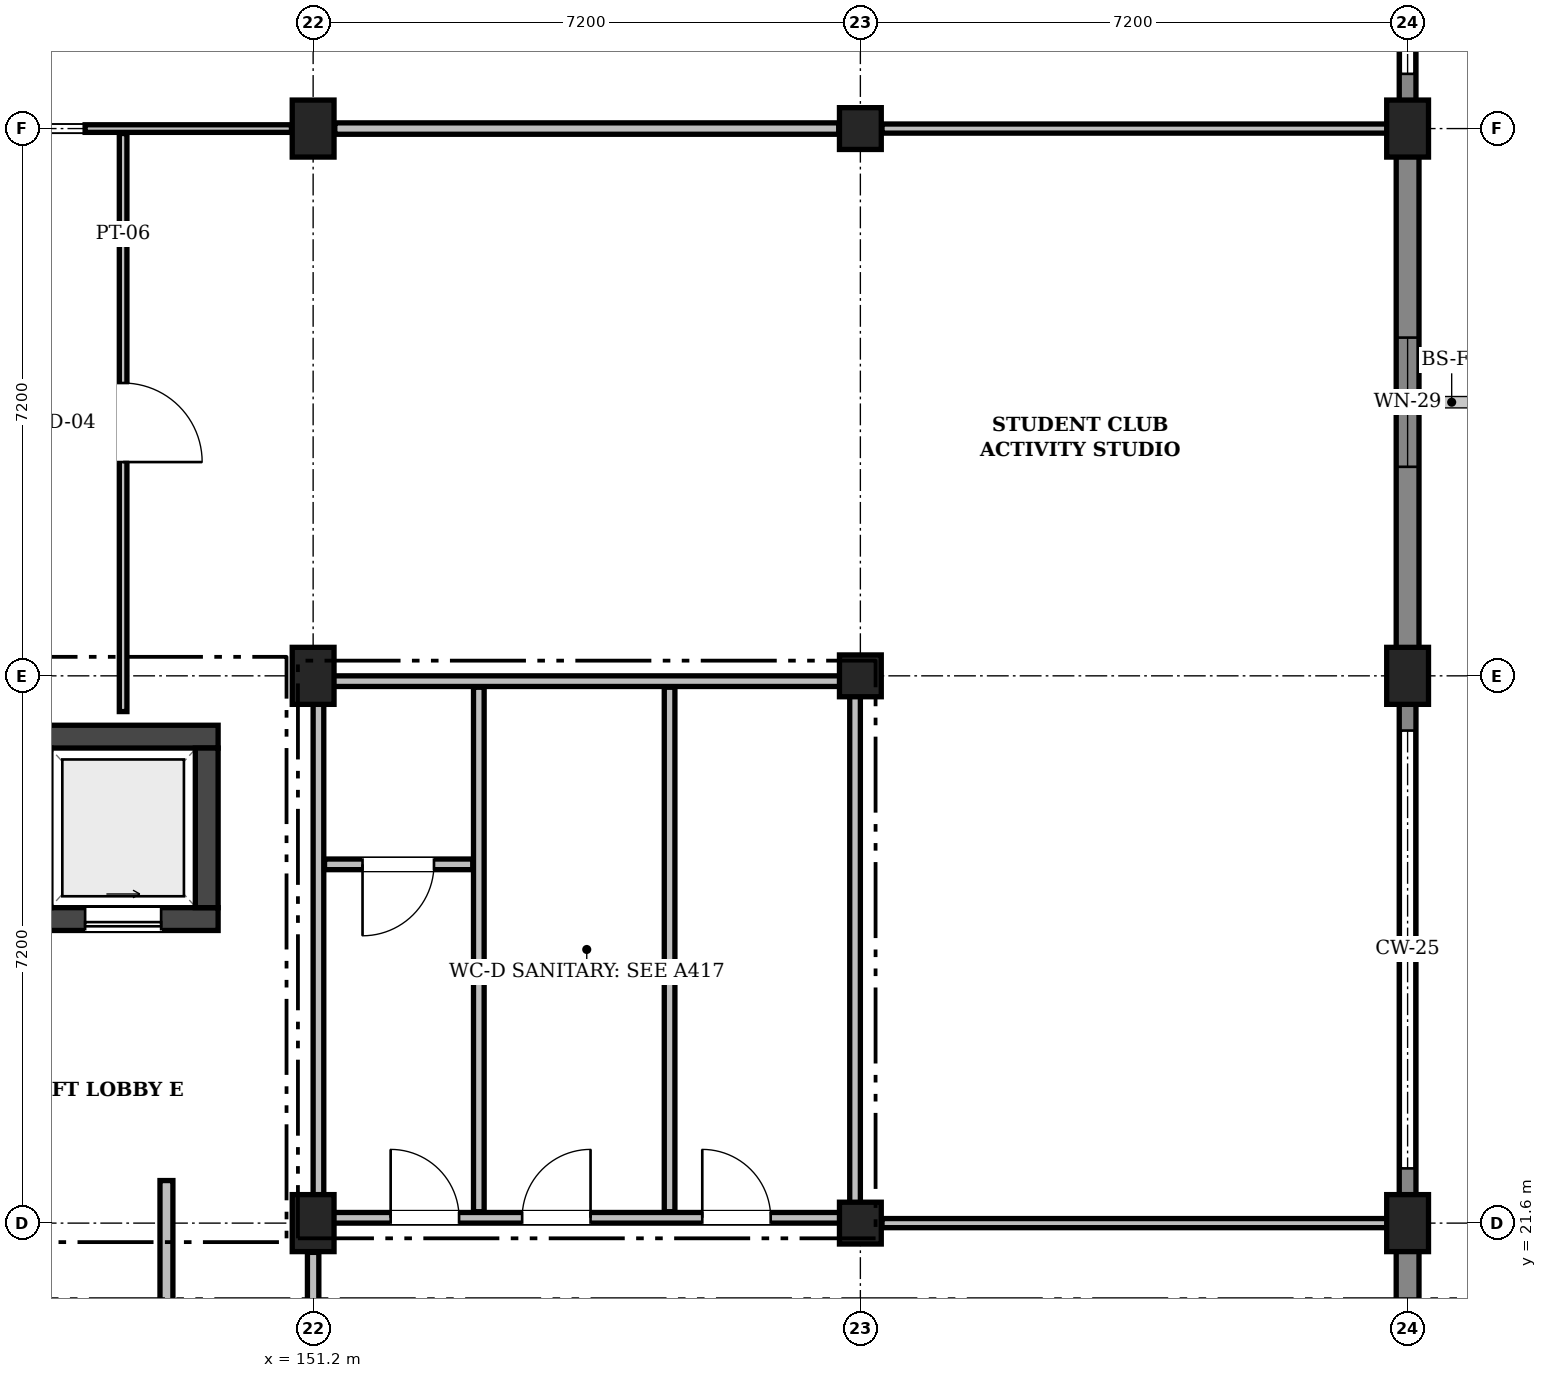
"""IFC4 building model, lengths in metres.
Left out: names, types, materials, properties, quantities, classifications, styles, units other than length and angle.
Written with IfcOpenShell. Run it as: python <this file> out.ifc"""

import sys

from ifc_helpers import new_model, si_unit, direction, frame, frame_2d, origin, origin_2d, place, context, subcontext, project, spatial, rectangle, extrude, element, fill, save


model = new_model("IFC4")
c1 = context("Model", 3, precision=1e-05, world=origin(), true_north=direction((0.0, 1.0)))
c2 = subcontext(c1, "Body", "Model", "MODEL_VIEW")
j1 = project(units=[si_unit("LENGTHUNIT", "METRE"), si_unit("PLANEANGLEUNIT", "RADIAN")], contexts=[c1])
p1 = place(None, origin())
s1 = spatial("IfcSite", under=j1, at=p1, CompositionType="ELEMENT")
p2 = place(p1, origin())
s2 = spatial("IfcBuilding", under=s1, at=p2, CompositionType="ELEMENT")
p3 = place(p2, frame((0.0, 0.0, 4.8)))
s3 = spatial("IfcBuildingStorey", under=s2, at=p3, CompositionType="ELEMENT", Elevation=4.8)
for number, where, z_axis, x_axis in (
    (1, (151.2, 21.6, 0.0), (0.0, 0.0, 1.0), (1.0, 0.0, 0.0)),
    (2, (151.2, 28.8, 0.0), (0.0, 0.0, 1.0), (1.0, 0.0, 0.0)),
    (3, (151.2, 36.0, 0.0), (0.0, 0.0, 1.0), (1.0, 0.0, 0.0)),
):
    element("IfcColumn", number, at=place(p3, frame(where, z_axis=z_axis, x_axis=x_axis)), inside=s3, PredefinedType="COLUMN", context=c2, shape_type="SweptSolid", body=[
        extrude(rectangle(XDim=0.55, YDim=0.75, at=origin_2d()), origin(), (0.0, 0.0, 1.0), 4.8),
    ])
for number, where, z_axis, x_axis in (
    (4, (158.4, 21.6, 0.0), (0.0, 0.0, 1.0), (1.0, 0.0, 0.0)),
    (5, (158.4, 28.8, 0.0), (0.0, 0.0, 1.0), (1.0, 0.0, 0.0)),
    (6, (158.4, 36.0, 0.0), (0.0, 0.0, 1.0), (1.0, 0.0, 0.0)),
):
    element("IfcColumn", number, at=place(p3, frame(where, z_axis=z_axis, x_axis=x_axis)), inside=s3, PredefinedType="COLUMN", context=c2, shape_type="SweptSolid", body=[
        extrude(rectangle(XDim=0.55, YDim=0.55, at=origin_2d()), origin(), (0.0, 0.0, 1.0), 4.8),
    ])
for number, where, z_axis, x_axis in (
    (7, (165.6, 21.6, 0.0), (0.0, 0.0, 1.0), (1.0, 0.0, 0.0)),
    (8, (165.6, 28.8, 0.0), (0.0, 0.0, 1.0), (1.0, 0.0, 0.0)),
    (9, (165.6, 36.0, 0.0), (0.0, 0.0, 1.0), (1.0, 0.0, 0.0)),
):
    element("IfcColumn", number, at=place(p3, frame(where, z_axis=z_axis, x_axis=x_axis)), inside=s3, PredefinedType="COLUMN", context=c2, shape_type="SweptSolid", body=[
        extrude(rectangle(XDim=0.55, YDim=0.75, at=origin_2d()), origin(), (0.0, 0.0, 1.0), 4.8),
    ])
p4 = place(p3, frame((165.6, 43.2, 0.0), z_axis=(0.0, 0.0, 1.0), x_axis=(0.0, -1.0, 0.0)))
e10 = element("IfcWall", 10, at=p4, inside=s3, PredefinedType="SOLIDWALL", context=c2, shape_type="SweptSolid", body=[
    extrude(rectangle(XDim=7.2, YDim=0.22, at=frame_2d((3.6, 0.0))), origin(), (0.0, 0.0, 1.0), 1.24),
])
p5 = place(p3, frame((165.6, 36.0, 0.0), z_axis=(0.0, 0.0, 1.0), x_axis=(0.0, -1.0, 0.0)))
e11 = element("IfcWall", 11, at=p5, inside=s3, PredefinedType="SOLIDWALL", context=c2, shape_type="SweptSolid", body=[
    extrude(rectangle(XDim=7.2, YDim=0.3, at=frame_2d((3.6, 0.0))), origin(), (0.0, 0.0, 1.0), 4.52),
])
p6 = place(p5, frame((2.75, 0.0, 0.95)))
e12 = element("IfcOpeningElement", 12, at=p6, cuts=e11, PredefinedType="OPENING", context=c2, shape_type="SweptSolid", body=[
    extrude(rectangle(XDim=1.7, YDim=1.8, at=frame_2d((0.85, 0.9))), frame((0.0, 0.162, 0.0), z_axis=(0.0, -1.0, 0.0), x_axis=(1.0, 0.0, 0.0)), (0.0, 0.0, 1.0), 0.324),
])
p7 = place(p3, frame((165.6, 28.8, 0.0), z_axis=(0.0, 0.0, 1.0), x_axis=(0.0, -1.0, 0.0)))
e13 = element("IfcWall", 13, at=p7, inside=s3, PredefinedType="SOLIDWALL", context=c2, shape_type="SweptSolid", body=[
    extrude(rectangle(XDim=7.2, YDim=0.22, at=frame_2d((3.6, 0.0))), origin(), (0.0, 0.0, 1.0), 1.24),
])
p8 = place(p3, frame((165.6, 21.6, 0.0), z_axis=(0.0, 0.0, 1.0), x_axis=(0.0, -1.0, 0.0)))
e14 = element("IfcWall", 14, at=p8, inside=s3, PredefinedType="SOLIDWALL", context=c2, shape_type="SweptSolid", body=[
    extrude(rectangle(XDim=7.2, YDim=0.3, at=frame_2d((3.6, 0.0))), origin(), (0.0, 0.0, 1.0), 4.52),
])
p9 = place(p8, frame((2.625, 0.0, 0.95)))
e15 = element("IfcOpeningElement", 15, at=p9, cuts=e14, PredefinedType="OPENING", context=c2, shape_type="SweptSolid", body=[
    extrude(rectangle(XDim=1.95, YDim=1.8, at=frame_2d((0.975, 0.9))), frame((0.0, 0.162, 0.0), z_axis=(0.0, -1.0, 0.0), x_axis=(1.0, 0.0, 0.0)), (0.0, 0.0, 1.0), 0.324),
])
p10 = place(p3, frame((147.45, 25.6, 0.0), z_axis=(0.0, 0.0, 1.0), x_axis=(1.0, 0.0, 0.0)))
e16 = element("IfcWall", 16, at=p10, inside=s3, PredefinedType="SHEAR", context=c2, shape_type="SweptSolid", body=[
    extrude(rectangle(XDim=2.5, YDim=0.3, at=frame_2d((1.25, 0.0))), origin(), (0.0, 0.0, 1.0), 4.55),
])
p11 = place(p10, frame((0.75, 0.0, 0.0)))
e17 = element("IfcOpeningElement", 17, at=p11, cuts=e16, PredefinedType="OPENING", context=c2, shape_type="SweptSolid", body=[
    extrude(rectangle(XDim=1.0, YDim=2.1, at=frame_2d((0.5, 1.05))), frame((0.0, 0.162, 0.0), z_axis=(0.0, -1.0, 0.0), x_axis=(1.0, 0.0, 0.0)), (0.0, 0.0, 1.0), 0.324),
])
p12 = place(p3, frame((147.45, 28.0, 0.0), z_axis=(0.0, 0.0, 1.0), x_axis=(1.0, 0.0, 0.0)))
e18 = element("IfcWall", 18, at=p12, inside=s3, PredefinedType="SHEAR", context=c2, shape_type="SweptSolid", body=[
    extrude(rectangle(XDim=2.5, YDim=0.3, at=frame_2d((1.25, 0.0))), origin(), (0.0, 0.0, 1.0), 4.55),
])
p13 = place(p3, frame((149.8, 25.75, 0.0), z_axis=(0.0, 0.0, 1.0), x_axis=(0.0, 1.0, 0.0)))
e19 = element("IfcWall", 19, at=p13, inside=s3, PredefinedType="SHEAR", context=c2, shape_type="SweptSolid", body=[
    extrude(rectangle(XDim=2.1, YDim=0.3, at=frame_2d((1.05, 0.0))), origin(), (0.0, 0.0, 1.0), 4.55),
])
p14 = place(p3, frame((151.27, 21.67, 0.0), z_axis=(0.0, 0.0, 1.0), x_axis=(1.0, 0.0, 0.0)))
e20 = element("IfcWall", 20, at=p14, inside=s3, PredefinedType="PARTITIONING", context=c2, shape_type="SweptSolid", body=[
    extrude(rectangle(XDim=7.06, YDim=0.14, at=frame_2d((3.53, 0.0))), origin(), (0.0, 0.0, 1.0), 3.9),
])
p15 = place(p14, frame((0.95, 0.0, 0.0)))
e21 = element("IfcOpeningElement", 21, at=p15, cuts=e20, PredefinedType="OPENING", context=c2, shape_type="SweptSolid", body=[
    extrude(rectangle(XDim=0.9, YDim=2.08, at=frame_2d((0.45, 1.04))), frame((0.0, 0.082, 0.0), z_axis=(0.0, -1.0, 0.0), x_axis=(1.0, 0.0, 0.0)), (0.0, 0.0, 1.0), 0.164),
])
p16 = place(p14, frame((2.68, 0.0, 0.0)))
e22 = element("IfcOpeningElement", 22, at=p16, cuts=e20, PredefinedType="OPENING", context=c2, shape_type="SweptSolid", body=[
    extrude(rectangle(XDim=0.9, YDim=2.08, at=frame_2d((0.45, 1.04))), frame((0.0, 0.082, 0.0), z_axis=(0.0, -1.0, 0.0), x_axis=(1.0, 0.0, 0.0)), (0.0, 0.0, 1.0), 0.164),
])
p17 = place(p14, frame((5.05, 0.0, 0.0)))
e23 = element("IfcOpeningElement", 23, at=p17, cuts=e20, PredefinedType="OPENING", context=c2, shape_type="SweptSolid", body=[
    extrude(rectangle(XDim=0.9, YDim=2.08, at=frame_2d((0.45, 1.04))), frame((0.0, 0.082, 0.0), z_axis=(0.0, -1.0, 0.0), x_axis=(1.0, 0.0, 0.0)), (0.0, 0.0, 1.0), 0.164),
])
p18 = place(p3, frame((151.27, 28.73, 0.0), z_axis=(0.0, 0.0, 1.0), x_axis=(1.0, 0.0, 0.0)))
e24 = element("IfcWall", 24, at=p18, inside=s3, PredefinedType="PARTITIONING", context=c2, shape_type="SweptSolid", body=[
    extrude(rectangle(XDim=7.06, YDim=0.14, at=frame_2d((3.53, 0.0))), origin(), (0.0, 0.0, 1.0), 3.9),
])
for number, where, z_axis, x_axis in (
    (25, (151.27, 21.75, 0.0), (0.0, 0.0, 1.0), (0.0, 1.0, 0.0)),
    (26, (158.33, 21.75, 0.0), (0.0, 0.0, 1.0), (0.0, 1.0, 0.0)),
):
    element("IfcWall", number, at=place(p3, frame(where, z_axis=z_axis, x_axis=x_axis)), inside=s3, PredefinedType="PARTITIONING", context=c2, shape_type="SweptSolid", body=[
        extrude(rectangle(XDim=6.9, YDim=0.14, at=frame_2d((3.45, 0.0))), origin(), (0.0, 0.0, 1.0), 4.08),
    ])
for number, where, z_axis, x_axis in (
    (27, (153.38, 21.75, 0.0), (0.0, 0.0, 1.0), (0.0, 1.0, 0.0)),
    (28, (155.89, 21.75, 0.0), (0.0, 0.0, 1.0), (0.0, 1.0, 0.0)),
):
    element("IfcWall", number, at=place(p3, frame(where, z_axis=z_axis, x_axis=x_axis)), inside=s3, PredefinedType="PARTITIONING", context=c2, shape_type="SweptSolid", body=[
        extrude(rectangle(XDim=6.9, YDim=0.14, at=frame_2d((3.45, 0.0))), origin(), (0.0, 0.0, 1.0), 4.46),
    ])
p19 = place(p3, frame((151.35, 26.32, 0.0), z_axis=(0.0, 0.0, 1.0), x_axis=(1.0, 0.0, 0.0)))
e29 = element("IfcWall", 29, at=p19, inside=s3, PredefinedType="PARTITIONING", context=c2, shape_type="SweptSolid", body=[
    extrude(rectangle(XDim=1.95, YDim=0.14, at=frame_2d((0.975, 0.0))), origin(), (0.0, 0.0, 1.0), 4.46),
])
p20 = place(p19, frame((0.5, 0.0, 0.0)))
e30 = element("IfcOpeningElement", 30, at=p20, cuts=e29, PredefinedType="OPENING", context=c2, shape_type="SweptSolid", body=[
    extrude(rectangle(XDim=0.94, YDim=2.1, at=frame_2d((0.47, 1.05))), frame((0.0, 0.082, 0.0), z_axis=(0.0, -1.0, 0.0), x_axis=(1.0, 0.0, 0.0)), (0.0, 0.0, 1.0), 0.164),
])
p21 = place(p3, frame((149.27, 19.698, 0.0), z_axis=(0.0, 0.0, 1.0), x_axis=(0.0, 1.0, 0.0)))
e31 = element("IfcWall", 31, at=p21, inside=s3, PredefinedType="PARTITIONING", context=c2, shape_type="SweptSolid", body=[
    extrude(rectangle(XDim=2.462, YDim=0.17, at=frame_2d((1.231, 0.0))), origin(), (0.0, 0.0, 1.0), 4.46),
])
p22 = place(p3, frame((151.485, 36.0, 0.0), z_axis=(0.0, 0.0, 1.0), x_axis=(1.0, 0.0, 0.0)))
e32 = element("IfcWall", 32, at=p22, inside=s3, PredefinedType="PARTITIONING", context=c2, shape_type="SweptSolid", body=[
    extrude(rectangle(XDim=6.63, YDim=0.15, at=frame_2d((3.315, 0.0))), origin(), (0.0, 0.0, 1.0), 3.9),
])
p23 = place(p3, frame((158.685, 36.0, 0.0), z_axis=(0.0, 0.0, 1.0), x_axis=(1.0, 0.0, 0.0)))
e33 = element("IfcWall", 33, at=p23, inside=s3, PredefinedType="PARTITIONING", context=c2, shape_type="SweptSolid", body=[
    extrude(rectangle(XDim=6.753, YDim=0.12, at=frame_2d((3.376, 0.0))), origin(), (0.0, 0.0, 1.0), 3.9),
])
p24 = place(p3, frame((148.2, 36.0, 0.0), z_axis=(0.0, 0.0, 1.0), x_axis=(1.0, 0.0, 0.0)))
e34 = element("IfcWall", 34, at=p24, inside=s3, PredefinedType="PARTITIONING", context=c2, shape_type="SweptSolid", body=[
    extrude(rectangle(XDim=2.715, YDim=0.1, at=frame_2d((1.357, 0.0))), origin(), (0.0, 0.0, 1.0), 3.9),
])
p25 = place(p3, frame((151.2, 14.785, 0.0), z_axis=(0.0, 0.0, 1.0), x_axis=(0.0, 1.0, 0.0)))
e35 = element("IfcWall", 35, at=p25, inside=s3, PredefinedType="PARTITIONING", context=c2, shape_type="SweptSolid", body=[
    extrude(rectangle(XDim=6.43, YDim=0.15, at=frame_2d((3.215, 0.0))), origin(), (0.0, 0.0, 1.0), 4.08),
])
p26 = place(p3, frame((158.685, 21.6, 0.0), z_axis=(0.0, 0.0, 1.0), x_axis=(1.0, 0.0, 0.0)))
e36 = element("IfcWall", 36, at=p26, inside=s3, PredefinedType="PARTITIONING", context=c2, shape_type="SweptSolid", body=[
    extrude(rectangle(XDim=6.753, YDim=0.12, at=frame_2d((3.376, 0.0))), origin(), (0.0, 0.0, 1.0), 3.9),
])
p27 = place(p3, frame((148.7, 28.33, 0.0), z_axis=(0.0, 0.0, 1.0), x_axis=(0.0, 1.0, 0.0)))
e37 = element("IfcWall", 37, at=p27, inside=s3, PredefinedType="PARTITIONING", context=c2, shape_type="SweptSolid", body=[
    extrude(rectangle(XDim=7.605, YDim=0.1, at=frame_2d((3.802, 0.0))), origin(), (0.0, 0.0, 1.0), 4.46),
])
p28 = place(p27, frame((3.282, 0.0, 0.0)))
e38 = element("IfcOpeningElement", 38, at=p28, cuts=e37, PredefinedType="OPENING", context=c2, shape_type="SweptSolid", body=[
    extrude(rectangle(XDim=1.04, YDim=2.18, at=frame_2d((0.52, 1.09))), frame((0.0, 0.062, 0.0), z_axis=(0.0, -1.0, 0.0), x_axis=(1.0, 0.0, 0.0)), (0.0, 0.0, 1.0), 0.124),
])
p29 = place(p6, origin())
e39 = element("IfcWindow", 39, at=p29, inside=s3, PartitioningType="SINGLE_PANEL", PredefinedType="WINDOW", context=c2, shape_type="SweptSolid", body=[
    extrude(rectangle(XDim=1.7, YDim=1.8, at=frame_2d((0.85, 0.9))), frame((0.0, 0.03, 0.0), z_axis=(0.0, -1.0, 0.0), x_axis=(1.0, 0.0, 0.0)), (0.0, 0.0, 1.0), 0.06),
])
fill(e12, e39)
p30 = place(p11, frame((1.0, 0.0, 0.0), z_axis=(0.0, 0.0, 1.0), x_axis=(-1.0, 0.0, 0.0)))
e40 = element("IfcDoor", 40, at=p30, inside=s3, OperationType="SLIDING_TO_RIGHT", PredefinedType="DOOR", context=c2, shape_type="SweptSolid", body=[
    extrude(rectangle(XDim=1.0, YDim=2.1, at=frame_2d((0.5, 1.05))), frame((0.0, 0.025, 0.0), z_axis=(0.0, -1.0, 0.0), x_axis=(1.0, 0.0, 0.0)), (0.0, 0.0, 1.0), 0.05),
])
fill(e17, e40)
p31 = place(p15, origin())
e41 = element("IfcDoor", 41, at=p31, inside=s3, OperationType="SINGLE_SWING_LEFT", PredefinedType="DOOR", context=c2, shape_type="SweptSolid", body=[
    extrude(rectangle(XDim=0.9, YDim=2.08, at=frame_2d((0.45, 1.04))), frame((0.0, 0.025, 0.0), z_axis=(0.0, -1.0, 0.0), x_axis=(1.0, 0.0, 0.0)), (0.0, 0.0, 1.0), 0.05),
])
fill(e21, e41)
p32 = place(p16, origin())
e42 = element("IfcDoor", 42, at=p32, inside=s3, OperationType="SINGLE_SWING_RIGHT", PredefinedType="DOOR", context=c2, shape_type="SweptSolid", body=[
    extrude(rectangle(XDim=0.9, YDim=2.08, at=frame_2d((0.45, 1.04))), frame((0.0, 0.025, 0.0), z_axis=(0.0, -1.0, 0.0), x_axis=(1.0, 0.0, 0.0)), (0.0, 0.0, 1.0), 0.05),
])
fill(e22, e42)
p33 = place(p17, origin())
e43 = element("IfcDoor", 43, at=p33, inside=s3, OperationType="SINGLE_SWING_LEFT", PredefinedType="DOOR", context=c2, shape_type="SweptSolid", body=[
    extrude(rectangle(XDim=0.9, YDim=2.08, at=frame_2d((0.45, 1.04))), frame((0.0, 0.025, 0.0), z_axis=(0.0, -1.0, 0.0), x_axis=(1.0, 0.0, 0.0)), (0.0, 0.0, 1.0), 0.05),
])
fill(e23, e43)
p34 = place(p20, frame((0.94, 0.0, 0.0), z_axis=(0.0, 0.0, 1.0), x_axis=(-1.0, 0.0, 0.0)))
e44 = element("IfcDoor", 44, at=p34, inside=s3, OperationType="SINGLE_SWING_RIGHT", PredefinedType="DOOR", context=c2, shape_type="SweptSolid", body=[
    extrude(rectangle(XDim=0.94, YDim=2.1, at=frame_2d((0.47, 1.05))), frame((0.0, 0.025, 0.0), z_axis=(0.0, -1.0, 0.0), x_axis=(1.0, 0.0, 0.0)), (0.0, 0.0, 1.0), 0.05),
])
fill(e30, e44)
p35 = place(p28, frame((1.04, 0.0, 0.0), z_axis=(0.0, 0.0, 1.0), x_axis=(-1.0, 0.0, 0.0)))
e45 = element("IfcDoor", 45, at=p35, inside=s3, OperationType="SINGLE_SWING_RIGHT", PredefinedType="DOOR", context=c2, shape_type="SweptSolid", body=[
    extrude(rectangle(XDim=1.04, YDim=2.18, at=frame_2d((0.52, 1.09))), frame((0.0, 0.025, 0.0), z_axis=(0.0, -1.0, 0.0), x_axis=(1.0, 0.0, 0.0)), (0.0, 0.0, 1.0), 0.05),
])
fill(e38, e45)
save(model, sys.argv[1])
